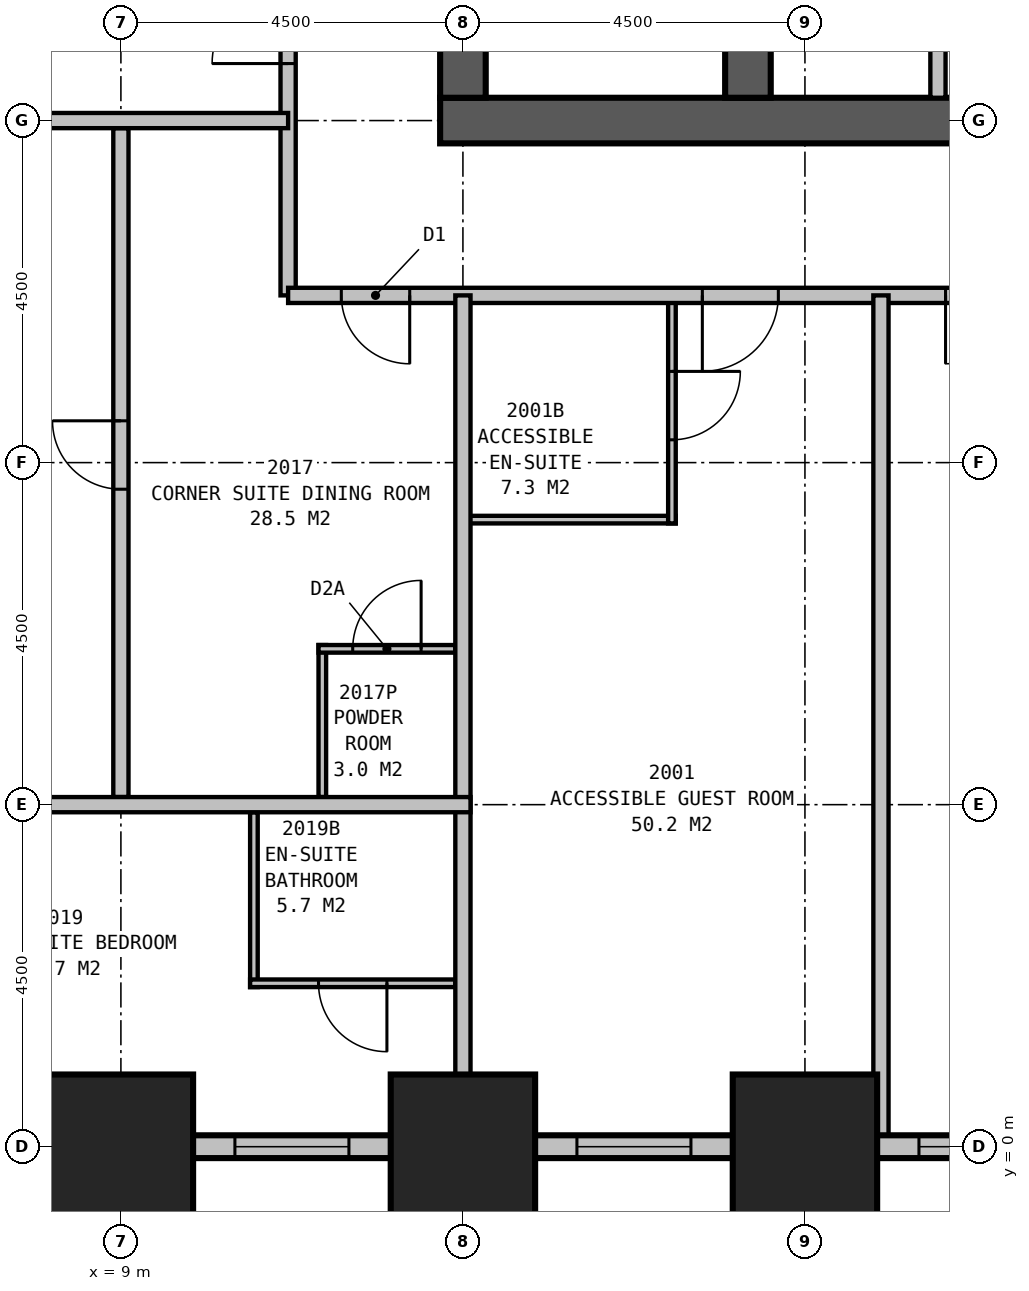
"""IFC4 building model, lengths in metres.
Left out: names, types, materials, properties, quantities, classifications, styles, units other than length and angle.
Written with IfcOpenShell. Run it as: python <this file> out.ifc"""

import sys

from ifc_helpers import new_model, si_unit, direction, frame, frame_2d, origin, origin_2d, place, context, subcontext, project, spatial, rectangle, extrude, element, fill, save


model = new_model("IFC4")
c1 = context("Model", 3, precision=1e-05, world=origin(), true_north=direction((0.0, 1.0)))
c2 = subcontext(c1, "Body", "Model", "MODEL_VIEW")
j1 = project(units=[si_unit("LENGTHUNIT", "METRE"), si_unit("PLANEANGLEUNIT", "RADIAN")], contexts=[c1])
p1 = place(None, origin())
s1 = spatial("IfcSite", under=j1, at=p1, CompositionType="ELEMENT")
p2 = place(p1, origin())
s2 = spatial("IfcBuilding", under=s1, at=p2, CompositionType="ELEMENT")
p3 = place(p2, frame((0.0, 0.0, 82.2)))
s3 = spatial("IfcBuildingStorey", under=s2, at=p3, CompositionType="ELEMENT", Elevation=82.2)
for number, where, z_axis, x_axis in (
    (1, (9.0, 0.0, 0.0), (0.0, 0.0, 1.0), (1.0, 0.0, 0.0)),
    (2, (13.5, 0.0, 0.0), (0.0, 0.0, 1.0), (1.0, 0.0, 0.0)),
    (3, (18.0, 0.0, 0.0), (0.0, 0.0, 1.0), (1.0, 0.0, 0.0)),
):
    element("IfcColumn", number, at=place(p3, frame(where, z_axis=z_axis, x_axis=x_axis)), inside=s3, PredefinedType="COLUMN", context=c2, shape_type="SweptSolid", body=[
        extrude(rectangle(XDim=1.9, YDim=1.9, at=origin_2d()), origin(), (0.0, 0.0, 1.0), 3.5),
    ])
p4 = place(p3, frame((13.2, 13.5, 0.0), z_axis=(0.0, 0.0, 1.0), x_axis=(1.0, 0.0, 0.0)))
e4 = element("IfcWall", 4, at=p4, inside=s3, PredefinedType="SHEAR", context=c2, shape_type="SweptSolid", body=[
    extrude(rectangle(XDim=23.1, YDim=0.6, at=frame_2d((11.55, 0.0))), origin(), (0.0, 0.0, 1.0), 3.5),
])
p5 = place(p3, frame((17.25, 13.8, 0.0), z_axis=(0.0, 0.0, 1.0), x_axis=(0.0, 1.0, 0.0)))
e5 = element("IfcWall", 5, at=p5, inside=s3, PredefinedType="SHEAR", context=c2, shape_type="SweptSolid", body=[
    extrude(rectangle(XDim=12.9, YDim=0.6, at=frame_2d((6.45, 0.0))), origin(), (0.0, 0.0, 1.0), 3.5),
])
p6 = place(p5, frame((3.85, 0.0, 0.0)))
e6 = element("IfcOpeningElement", 6, at=p6, cuts=e5, PredefinedType="OPENING", context=c2, shape_type="SweptSolid", body=[
    extrude(rectangle(XDim=1.2, YDim=2.1, at=frame_2d((0.6, 1.05))), frame((0.0, 0.31, 0.0), z_axis=(0.0, -1.0, 0.0), x_axis=(1.0, 0.0, 0.0)), (0.0, 0.0, 1.0), 0.62),
])
p7 = place(p3, frame((13.5, 16.5, 0.0), z_axis=(0.0, 0.0, 1.0), x_axis=(0.0, -1.0, 0.0)))
e7 = element("IfcWall", 7, at=p7, inside=s3, PredefinedType="SHEAR", context=c2, shape_type="SweptSolid", body=[
    extrude(rectangle(XDim=2.7, YDim=0.6, at=frame_2d((1.35, 0.0))), origin(), (0.0, 0.0, 1.0), 3.5),
])
p8 = place(p3, frame((4.35, 0.0, 0.0), z_axis=(0.0, 0.0, 1.0), x_axis=(1.0, 0.0, 0.0)))
e8 = element("IfcWall", 8, at=p8, inside=s3, PredefinedType="STANDARD", context=c2, shape_type="SweptSolid", body=[
    extrude(rectangle(XDim=40.8, YDim=0.3, at=frame_2d((20.4, 0.0))), origin(), (0.0, 0.0, 1.0), 2.1),
])
p9 = place(p8, frame((1.65, 0.0, 0.5)))
e9 = element("IfcOpeningElement", 9, at=p9, cuts=e8, PredefinedType="OPENING", context=c2, shape_type="SweptSolid", body=[
    extrude(rectangle(XDim=1.5, YDim=1.4, at=frame_2d((0.75, 0.7))), frame((0.0, 0.16, 0.0), z_axis=(0.0, -1.0, 0.0), x_axis=(1.0, 0.0, 0.0)), (0.0, 0.0, 1.0), 0.32),
])
p10 = place(p8, frame((6.15, 0.0, 0.5)))
e10 = element("IfcOpeningElement", 10, at=p10, cuts=e8, PredefinedType="OPENING", context=c2, shape_type="SweptSolid", body=[
    extrude(rectangle(XDim=1.5, YDim=1.4, at=frame_2d((0.75, 0.7))), frame((0.0, 0.16, 0.0), z_axis=(0.0, -1.0, 0.0), x_axis=(1.0, 0.0, 0.0)), (0.0, 0.0, 1.0), 0.32),
])
p11 = place(p8, frame((10.65, 0.0, 0.5)))
e11 = element("IfcOpeningElement", 11, at=p11, cuts=e8, PredefinedType="OPENING", context=c2, shape_type="SweptSolid", body=[
    extrude(rectangle(XDim=1.5, YDim=1.4, at=frame_2d((0.75, 0.7))), frame((0.0, 0.16, 0.0), z_axis=(0.0, -1.0, 0.0), x_axis=(1.0, 0.0, 0.0)), (0.0, 0.0, 1.0), 0.32),
])
p12 = place(p8, frame((15.15, 0.0, 0.5)))
e12 = element("IfcOpeningElement", 12, at=p12, cuts=e8, PredefinedType="OPENING", context=c2, shape_type="SweptSolid", body=[
    extrude(rectangle(XDim=1.5, YDim=1.4, at=frame_2d((0.75, 0.7))), frame((0.0, 0.16, 0.0), z_axis=(0.0, -1.0, 0.0), x_axis=(1.0, 0.0, 0.0)), (0.0, 0.0, 1.0), 0.32),
])
p13 = place(p8, frame((19.65, 0.0, 0.5)))
e13 = element("IfcOpeningElement", 13, at=p13, cuts=e8, PredefinedType="OPENING", context=c2, shape_type="SweptSolid", body=[
    extrude(rectangle(XDim=1.5, YDim=1.4, at=frame_2d((0.75, 0.7))), frame((0.0, 0.16, 0.0), z_axis=(0.0, -1.0, 0.0), x_axis=(1.0, 0.0, 0.0)), (0.0, 0.0, 1.0), 0.32),
])
p14 = place(p8, frame((24.15, 0.0, 0.5)))
e14 = element("IfcOpeningElement", 14, at=p14, cuts=e8, PredefinedType="OPENING", context=c2, shape_type="SweptSolid", body=[
    extrude(rectangle(XDim=1.5, YDim=1.4, at=frame_2d((0.75, 0.7))), frame((0.0, 0.16, 0.0), z_axis=(0.0, -1.0, 0.0), x_axis=(1.0, 0.0, 0.0)), (0.0, 0.0, 1.0), 0.32),
])
p15 = place(p8, frame((28.65, 0.0, 0.5)))
e15 = element("IfcOpeningElement", 15, at=p15, cuts=e8, PredefinedType="OPENING", context=c2, shape_type="SweptSolid", body=[
    extrude(rectangle(XDim=1.5, YDim=1.4, at=frame_2d((0.75, 0.7))), frame((0.0, 0.16, 0.0), z_axis=(0.0, -1.0, 0.0), x_axis=(1.0, 0.0, 0.0)), (0.0, 0.0, 1.0), 0.32),
])
p16 = place(p8, frame((33.15, 0.0, 0.5)))
e16 = element("IfcOpeningElement", 16, at=p16, cuts=e8, PredefinedType="OPENING", context=c2, shape_type="SweptSolid", body=[
    extrude(rectangle(XDim=1.5, YDim=1.4, at=frame_2d((0.75, 0.7))), frame((0.0, 0.16, 0.0), z_axis=(0.0, -1.0, 0.0), x_axis=(1.0, 0.0, 0.0)), (0.0, 0.0, 1.0), 0.32),
])
p17 = place(p8, frame((37.65, 0.0, 0.5)))
e17 = element("IfcOpeningElement", 17, at=p17, cuts=e8, PredefinedType="OPENING", context=c2, shape_type="SweptSolid", body=[
    extrude(rectangle(XDim=1.5, YDim=1.4, at=frame_2d((0.75, 0.7))), frame((0.0, 0.16, 0.0), z_axis=(0.0, -1.0, 0.0), x_axis=(1.0, 0.0, 0.0)), (0.0, 0.0, 1.0), 0.32),
])
p18 = place(p3, frame((11.2, 11.2, 0.0), z_axis=(0.0, 0.0, 1.0), x_axis=(1.0, 0.0, 0.0)))
e18 = element("IfcWall", 18, at=p18, inside=s3, PredefinedType="PARTITIONING", context=c2, shape_type="SweptSolid", body=[
    extrude(rectangle(XDim=27.1, YDim=0.2, at=frame_2d((13.55, 0.0))), origin(), (0.0, 0.0, 1.0), 3.25),
])
p19 = place(p18, frame((6.45, 0.0, 0.0), z_axis=(0.0, 0.0, 1.0), x_axis=(-1.0, 0.0, 0.0)))
e19 = element("IfcOpeningElement", 19, at=p19, cuts=e18, PredefinedType="OPENING", context=c2, shape_type="SweptSolid", body=[
    extrude(rectangle(XDim=1.0, YDim=2.1, at=frame_2d((0.5, 1.05))), frame((0.0, 0.11, 0.0), z_axis=(0.0, -1.0, 0.0), x_axis=(1.0, 0.0, 0.0)), (0.0, 0.0, 1.0), 0.22),
])
p20 = place(p18, frame((9.55, 0.0, 0.0), z_axis=(0.0, 0.0, 1.0), x_axis=(-1.0, 0.0, 0.0)))
e20 = element("IfcOpeningElement", 20, at=p20, cuts=e18, PredefinedType="OPENING", context=c2, shape_type="SweptSolid", body=[
    extrude(rectangle(XDim=0.9, YDim=2.1, at=frame_2d((0.45, 1.05))), frame((0.0, 0.11, 0.0), z_axis=(0.0, -1.0, 0.0), x_axis=(1.0, 0.0, 0.0)), (0.0, 0.0, 1.0), 0.22),
])
p21 = place(p18, frame((15.95, 0.0, 0.0), z_axis=(0.0, 0.0, 1.0), x_axis=(-1.0, 0.0, 0.0)))
e21 = element("IfcOpeningElement", 21, at=p21, cuts=e18, PredefinedType="OPENING", context=c2, shape_type="SweptSolid", body=[
    extrude(rectangle(XDim=0.9, YDim=2.1, at=frame_2d((0.45, 1.05))), frame((0.0, 0.11, 0.0), z_axis=(0.0, -1.0, 0.0), x_axis=(1.0, 0.0, 0.0)), (0.0, 0.0, 1.0), 0.22),
])
p22 = place(p18, frame((20.0, 0.0, 0.0), z_axis=(0.0, 0.0, 1.0), x_axis=(-1.0, 0.0, 0.0)))
e22 = element("IfcOpeningElement", 22, at=p22, cuts=e18, PredefinedType="OPENING", context=c2, shape_type="SweptSolid", body=[
    extrude(rectangle(XDim=0.9, YDim=2.1, at=frame_2d((0.45, 1.05))), frame((0.0, 0.11, 0.0), z_axis=(0.0, -1.0, 0.0), x_axis=(1.0, 0.0, 0.0)), (0.0, 0.0, 1.0), 0.22),
])
p23 = place(p18, frame((24.45, 0.0, 0.0), z_axis=(0.0, 0.0, 1.0), x_axis=(-1.0, 0.0, 0.0)))
e23 = element("IfcOpeningElement", 23, at=p23, cuts=e18, PredefinedType="OPENING", context=c2, shape_type="SweptSolid", body=[
    extrude(rectangle(XDim=1.0, YDim=2.1, at=frame_2d((0.5, 1.05))), frame((0.0, 0.11, 0.0), z_axis=(0.0, -1.0, 0.0), x_axis=(1.0, 0.0, 0.0)), (0.0, 0.0, 1.0), 0.22),
])
p24 = place(p18, frame((1.6, 0.0, 0.0), z_axis=(0.0, 0.0, 1.0), x_axis=(-1.0, 0.0, 0.0)))
e24 = element("IfcOpeningElement", 24, at=p24, cuts=e18, PredefinedType="OPENING", context=c2, shape_type="SweptSolid", body=[
    extrude(rectangle(XDim=0.9, YDim=2.1, at=frame_2d((0.45, 1.05))), frame((0.0, 0.11, 0.0), z_axis=(0.0, -1.0, 0.0), x_axis=(1.0, 0.0, 0.0)), (0.0, 0.0, 1.0), 0.22),
])
p25 = place(p18, frame((26.4, 0.0, 0.0), z_axis=(0.0, 0.0, 1.0), x_axis=(-1.0, 0.0, 0.0)))
e25 = element("IfcOpeningElement", 25, at=p25, cuts=e18, PredefinedType="OPENING", context=c2, shape_type="SweptSolid", body=[
    extrude(rectangle(XDim=0.9, YDim=2.1, at=frame_2d((0.45, 1.05))), frame((0.0, 0.11, 0.0), z_axis=(0.0, -1.0, 0.0), x_axis=(1.0, 0.0, 0.0)), (0.0, 0.0, 1.0), 0.22),
])
p26 = place(p3, frame((11.2, 11.2, 0.0), z_axis=(0.0, 0.0, 1.0), x_axis=(0.0, 1.0, 0.0)))
e26 = element("IfcWall", 26, at=p26, inside=s3, PredefinedType="PARTITIONING", context=c2, shape_type="SweptSolid", body=[
    extrude(rectangle(XDim=18.7, YDim=0.2, at=frame_2d((9.35, 0.0))), origin(), (0.0, 0.0, 1.0), 3.25),
])
p27 = place(p26, frame((3.05, 0.0, 0.0)))
e27 = element("IfcOpeningElement", 27, at=p27, cuts=e26, PredefinedType="OPENING", context=c2, shape_type="SweptSolid", body=[
    extrude(rectangle(XDim=1.0, YDim=2.1, at=frame_2d((0.5, 1.05))), frame((0.0, 0.11, 0.0), z_axis=(0.0, -1.0, 0.0), x_axis=(1.0, 0.0, 0.0)), (0.0, 0.0, 1.0), 0.22),
])
p28 = place(p26, frame((6.65, 0.0, 0.0)))
e28 = element("IfcOpeningElement", 28, at=p28, cuts=e26, PredefinedType="OPENING", context=c2, shape_type="SweptSolid", body=[
    extrude(rectangle(XDim=0.9, YDim=2.1, at=frame_2d((0.45, 1.05))), frame((0.0, 0.11, 0.0), z_axis=(0.0, -1.0, 0.0), x_axis=(1.0, 0.0, 0.0)), (0.0, 0.0, 1.0), 0.22),
])
p29 = place(p3, frame((19.0, 11.2, 0.0), z_axis=(0.0, 0.0, 1.0), x_axis=(0.0, -1.0, 0.0)))
e29 = element("IfcWall", 29, at=p29, inside=s3, PredefinedType="PARTITIONING", context=c2, shape_type="SweptSolid", body=[
    extrude(rectangle(XDim=11.2, YDim=0.2, at=frame_2d((5.6, 0.0))), origin(), (0.0, 0.0, 1.0), 3.25),
])
p30 = place(p3, frame((13.5, 8.25, 0.0), z_axis=(0.0, 0.0, 1.0), x_axis=(1.0, 0.0, 0.0)))
e30 = element("IfcWall", 30, at=p30, inside=s3, PredefinedType="PLUMBINGWALL", context=c2, shape_type="SweptSolid", body=[
    extrude(rectangle(XDim=2.8, YDim=0.1, at=frame_2d((1.4, 0.0))), origin(), (0.0, 0.0, 1.0), 3.25),
])
p31 = place(p3, frame((16.25, 11.2, 0.0), z_axis=(0.0, 0.0, 1.0), x_axis=(0.0, -1.0, 0.0)))
e31 = element("IfcWall", 31, at=p31, inside=s3, PredefinedType="PLUMBINGWALL", context=c2, shape_type="SweptSolid", body=[
    extrude(rectangle(XDim=3.0, YDim=0.1, at=frame_2d((1.5, 0.0))), origin(), (0.0, 0.0, 1.0), 3.25),
])
p32 = place(p31, frame((1.0, 0.0, 0.0)))
e32 = element("IfcOpeningElement", 32, at=p32, cuts=e31, PredefinedType="OPENING", context=c2, shape_type="SweptSolid", body=[
    extrude(rectangle(XDim=0.9, YDim=2.1, at=frame_2d((0.45, 1.05))), frame((0.0, 0.06, 0.0), z_axis=(0.0, -1.0, 0.0), x_axis=(1.0, 0.0, 0.0)), (0.0, 0.0, 1.0), 0.12),
])
p33 = place(p3, frame((11.2, 13.5, 0.0), z_axis=(0.0, 0.0, 1.0), x_axis=(-1.0, 0.0, 0.0)))
e33 = element("IfcWall", 33, at=p33, inside=s3, PredefinedType="PARTITIONING", context=c2, shape_type="SweptSolid", body=[
    extrude(rectangle(XDim=9.921, YDim=0.2, at=frame_2d((4.96, 0.0))), origin(), (0.0, 0.0, 1.0), 1.9),
])
p34 = place(p3, frame((13.5, 11.2, 0.0), z_axis=(0.0, 0.0, 1.0), x_axis=(0.0, -1.0, 0.0)))
e34 = element("IfcWall", 34, at=p34, inside=s3, PredefinedType="PARTITIONING", context=c2, shape_type="SweptSolid", body=[
    extrude(rectangle(XDim=11.2, YDim=0.2, at=frame_2d((5.6, 0.0))), origin(), (0.0, 0.0, 1.0), 2.2),
])
p35 = place(p3, frame((13.6, 4.5, 0.0), z_axis=(0.0, 0.0, 1.0), x_axis=(-1.0, 0.0, 0.0)))
e35 = element("IfcWall", 35, at=p35, inside=s3, PredefinedType="PARTITIONING", context=c2, shape_type="SweptSolid", body=[
    extrude(rectangle(XDim=9.1, YDim=0.2, at=frame_2d((4.55, 0.0))), origin(), (0.0, 0.0, 1.0), 3.25),
])
p36 = place(p35, frame((7.1, 0.0, 0.0)))
e36 = element("IfcOpeningElement", 36, at=p36, cuts=e35, PredefinedType="OPENING", context=c2, shape_type="SweptSolid", body=[
    extrude(rectangle(XDim=0.9, YDim=2.1, at=frame_2d((0.45, 1.05))), frame((0.0, 0.11, 0.0), z_axis=(0.0, -1.0, 0.0), x_axis=(1.0, 0.0, 0.0)), (0.0, 0.0, 1.0), 0.22),
])
p37 = place(p3, frame((9.0, 4.6, 0.0), z_axis=(0.0, 0.0, 1.0), x_axis=(0.0, 1.0, 0.0)))
e37 = element("IfcWall", 37, at=p37, inside=s3, PredefinedType="PARTITIONING", context=c2, shape_type="SweptSolid", body=[
    extrude(rectangle(XDim=8.8, YDim=0.2, at=frame_2d((4.4, 0.0))), origin(), (0.0, 0.0, 1.0), 2.2),
])
p38 = place(p37, frame((4.05, 0.0, 0.0)))
e38 = element("IfcOpeningElement", 38, at=p38, cuts=e37, PredefinedType="OPENING", context=c2, shape_type="SweptSolid", body=[
    extrude(rectangle(XDim=0.9, YDim=2.1, at=frame_2d((0.45, 1.05))), frame((0.0, 0.11, 0.0), z_axis=(0.0, -1.0, 0.0), x_axis=(1.0, 0.0, 0.0)), (0.0, 0.0, 1.0), 0.22),
])
p39 = place(p3, frame((11.65, 4.6, 0.0), z_axis=(0.0, 0.0, 1.0), x_axis=(0.0, 1.0, 0.0)))
e39 = element("IfcWall", 39, at=p39, inside=s3, PredefinedType="PLUMBINGWALL", context=c2, shape_type="SweptSolid", body=[
    extrude(rectangle(XDim=2.0, YDim=0.1, at=frame_2d((1.0, 0.0))), origin(), (0.0, 0.0, 1.0), 3.25),
])
p40 = place(p3, frame((13.4, 6.55, 0.0), z_axis=(0.0, 0.0, 1.0), x_axis=(-1.0, 0.0, 0.0)))
e40 = element("IfcWall", 40, at=p40, inside=s3, PredefinedType="PLUMBINGWALL", context=c2, shape_type="SweptSolid", body=[
    extrude(rectangle(XDim=1.8, YDim=0.1, at=frame_2d((0.9, 0.0))), origin(), (0.0, 0.0, 1.0), 3.25),
])
p41 = place(p40, frame((1.35, 0.0, 0.0), z_axis=(0.0, 0.0, 1.0), x_axis=(-1.0, 0.0, 0.0)))
e41 = element("IfcOpeningElement", 41, at=p41, cuts=e40, PredefinedType="OPENING", context=c2, shape_type="SweptSolid", body=[
    extrude(rectangle(XDim=0.9, YDim=2.1, at=frame_2d((0.45, 1.05))), frame((0.0, 0.06, 0.0), z_axis=(0.0, -1.0, 0.0), x_axis=(1.0, 0.0, 0.0)), (0.0, 0.0, 1.0), 0.12),
])
p42 = place(p3, frame((10.75, 4.4, 0.0), z_axis=(0.0, 0.0, 1.0), x_axis=(0.0, -1.0, 0.0)))
e42 = element("IfcWall", 42, at=p42, inside=s3, PredefinedType="PLUMBINGWALL", context=c2, shape_type="SweptSolid", body=[
    extrude(rectangle(XDim=2.3, YDim=0.1, at=frame_2d((1.15, 0.0))), origin(), (0.0, 0.0, 1.0), 3.25),
])
p43 = place(p3, frame((13.4, 2.15, 0.0), z_axis=(0.0, 0.0, 1.0), x_axis=(-1.0, 0.0, 0.0)))
e43 = element("IfcWall", 43, at=p43, inside=s3, PredefinedType="PLUMBINGWALL", context=c2, shape_type="SweptSolid", body=[
    extrude(rectangle(XDim=2.7, YDim=0.1, at=frame_2d((1.35, 0.0))), origin(), (0.0, 0.0, 1.0), 3.25),
])
p44 = place(p43, frame((0.9, 0.0, 0.0)))
e44 = element("IfcOpeningElement", 44, at=p44, cuts=e43, PredefinedType="OPENING", context=c2, shape_type="SweptSolid", body=[
    extrude(rectangle(XDim=0.9, YDim=2.1, at=frame_2d((0.45, 1.05))), frame((0.0, 0.06, 0.0), z_axis=(0.0, -1.0, 0.0), x_axis=(1.0, 0.0, 0.0)), (0.0, 0.0, 1.0), 0.12),
])
p45 = place(p3, frame((19.75, 13.8, 0.0), z_axis=(0.0, 0.0, 1.0), x_axis=(0.0, 1.0, 0.0)))
e45 = element("IfcWall", 45, at=p45, inside=s3, PredefinedType="PARTITIONING", context=c2, shape_type="SweptSolid", body=[
    extrude(rectangle(XDim=2.4, YDim=0.2, at=frame_2d((1.2, 0.0))), origin(), (0.0, 0.0, 1.0), 3.25),
])
p46 = place(p10, origin())
e46 = element("IfcWindow", 46, at=p46, inside=s3, PartitioningType="SINGLE_PANEL", PredefinedType="WINDOW", context=c2, shape_type="SweptSolid", body=[
    extrude(rectangle(XDim=1.5, YDim=1.4, at=frame_2d((0.75, 0.7))), frame((0.0, 0.03, 0.0), z_axis=(0.0, -1.0, 0.0), x_axis=(1.0, 0.0, 0.0)), (0.0, 0.0, 1.0), 0.06),
])
fill(e10, e46)
p47 = place(p11, origin())
e47 = element("IfcWindow", 47, at=p47, inside=s3, PartitioningType="SINGLE_PANEL", PredefinedType="WINDOW", context=c2, shape_type="SweptSolid", body=[
    extrude(rectangle(XDim=1.5, YDim=1.4, at=frame_2d((0.75, 0.7))), frame((0.0, 0.03, 0.0), z_axis=(0.0, -1.0, 0.0), x_axis=(1.0, 0.0, 0.0)), (0.0, 0.0, 1.0), 0.06),
])
fill(e11, e47)
p48 = place(p12, origin())
e48 = element("IfcWindow", 48, at=p48, inside=s3, PartitioningType="SINGLE_PANEL", PredefinedType="WINDOW", context=c2, shape_type="SweptSolid", body=[
    extrude(rectangle(XDim=1.5, YDim=1.4, at=frame_2d((0.75, 0.7))), frame((0.0, 0.03, 0.0), z_axis=(0.0, -1.0, 0.0), x_axis=(1.0, 0.0, 0.0)), (0.0, 0.0, 1.0), 0.06),
])
fill(e12, e48)
p49 = place(p19, origin())
e49 = element("IfcDoor", 49, at=p49, inside=s3, OperationType="SINGLE_SWING_RIGHT", PredefinedType="DOOR", context=c2, shape_type="SweptSolid", body=[
    extrude(rectangle(XDim=1.0, YDim=2.1, at=frame_2d((0.5, 1.05))), frame((0.0, 0.025, 0.0), z_axis=(0.0, -1.0, 0.0), x_axis=(1.0, 0.0, 0.0)), (0.0, 0.0, 1.0), 0.05),
])
fill(e19, e49)
p50 = place(p20, origin())
e50 = element("IfcDoor", 50, at=p50, inside=s3, OperationType="SINGLE_SWING_RIGHT", PredefinedType="DOOR", context=c2, shape_type="SweptSolid", body=[
    extrude(rectangle(XDim=0.9, YDim=2.1, at=frame_2d((0.45, 1.05))), frame((0.0, 0.025, 0.0), z_axis=(0.0, -1.0, 0.0), x_axis=(1.0, 0.0, 0.0)), (0.0, 0.0, 1.0), 0.05),
])
fill(e20, e50)
p51 = place(p24, origin())
e51 = element("IfcDoor", 51, at=p51, inside=s3, OperationType="SINGLE_SWING_LEFT", PredefinedType="DOOR", context=c2, shape_type="SweptSolid", body=[
    extrude(rectangle(XDim=0.9, YDim=2.1, at=frame_2d((0.45, 1.05))), frame((0.0, 0.025, 0.0), z_axis=(0.0, -1.0, 0.0), x_axis=(1.0, 0.0, 0.0)), (0.0, 0.0, 1.0), 0.05),
])
fill(e24, e51)
p52 = place(p27, origin())
e52 = element("IfcDoor", 52, at=p52, inside=s3, OperationType="SINGLE_SWING_LEFT", PredefinedType="DOOR", context=c2, shape_type="SweptSolid", body=[
    extrude(rectangle(XDim=1.0, YDim=2.1, at=frame_2d((0.5, 1.05))), frame((0.0, 0.025, 0.0), z_axis=(0.0, -1.0, 0.0), x_axis=(1.0, 0.0, 0.0)), (0.0, 0.0, 1.0), 0.05),
])
fill(e27, e52)
p53 = place(p32, origin())
e53 = element("IfcDoor", 53, at=p53, inside=s3, OperationType="SINGLE_SWING_LEFT", PredefinedType="DOOR", context=c2, shape_type="SweptSolid", body=[
    extrude(rectangle(XDim=0.9, YDim=2.1, at=frame_2d((0.45, 1.05))), frame((0.0, 0.025, 0.0), z_axis=(0.0, -1.0, 0.0), x_axis=(1.0, 0.0, 0.0)), (0.0, 0.0, 1.0), 0.05),
])
fill(e32, e53)
p54 = place(p38, origin())
e54 = element("IfcDoor", 54, at=p54, inside=s3, OperationType="SINGLE_SWING_RIGHT", PredefinedType="DOOR", context=c2, shape_type="SweptSolid", body=[
    extrude(rectangle(XDim=0.9, YDim=2.1, at=frame_2d((0.45, 1.05))), frame((0.0, 0.025, 0.0), z_axis=(0.0, -1.0, 0.0), x_axis=(1.0, 0.0, 0.0)), (0.0, 0.0, 1.0), 0.05),
])
fill(e38, e54)
p55 = place(p41, origin())
e55 = element("IfcDoor", 55, at=p55, inside=s3, OperationType="SINGLE_SWING_RIGHT", PredefinedType="DOOR", context=c2, shape_type="SweptSolid", body=[
    extrude(rectangle(XDim=0.9, YDim=2.1, at=frame_2d((0.45, 1.05))), frame((0.0, 0.025, 0.0), z_axis=(0.0, -1.0, 0.0), x_axis=(1.0, 0.0, 0.0)), (0.0, 0.0, 1.0), 0.05),
])
fill(e41, e55)
p56 = place(p44, origin())
e56 = element("IfcDoor", 56, at=p56, inside=s3, OperationType="SINGLE_SWING_LEFT", PredefinedType="DOOR", context=c2, shape_type="SweptSolid", body=[
    extrude(rectangle(XDim=0.9, YDim=2.1, at=frame_2d((0.45, 1.05))), frame((0.0, 0.025, 0.0), z_axis=(0.0, -1.0, 0.0), x_axis=(1.0, 0.0, 0.0)), (0.0, 0.0, 1.0), 0.05),
])
fill(e44, e56)
save(model, sys.argv[1])
